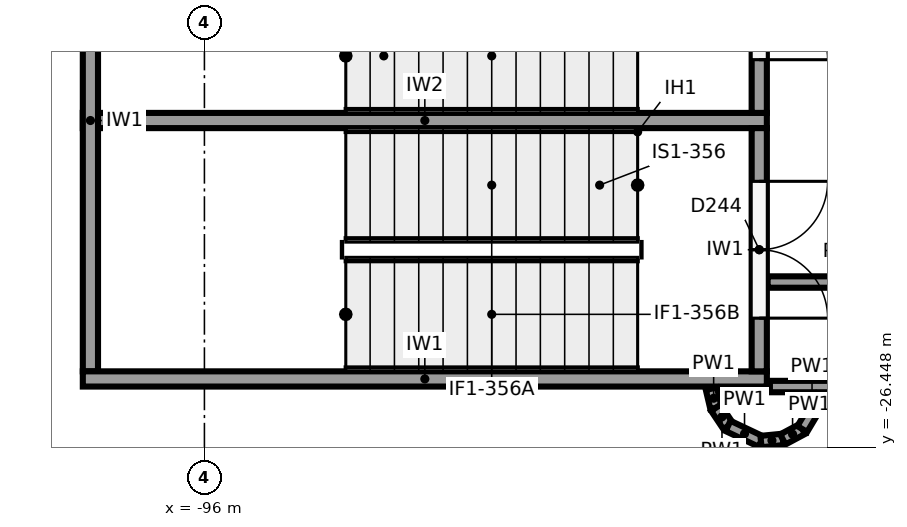
"""IFC4 building model, lengths in metres.
Left out: names, types, materials, properties, quantities, classifications, styles, units other than length and angle.
Written with IfcOpenShell. Run it as: python <this file> out.ifc"""

import sys

from ifc_helpers import new_model, si_unit, direction, frame, frame_2d, origin, place, context, subcontext, project, spatial, rectangle, extrude, element, fill, save


model = new_model("IFC4")
c1 = context("Model", 3, precision=1e-05, world=origin(), true_north=direction((0.0, 1.0)))
c2 = subcontext(c1, "Body", "Model", "MODEL_VIEW")
j1 = project(units=[si_unit("LENGTHUNIT", "METRE"), si_unit("PLANEANGLEUNIT", "RADIAN")], contexts=[c1])
p1 = place(None, origin())
s1 = spatial("IfcSite", under=j1, at=p1, CompositionType="ELEMENT")
p2 = place(p1, origin())
s2 = spatial("IfcBuilding", under=s1, at=p2, CompositionType="ELEMENT")
p3 = place(p2, frame((0.0, 0.0, -4.0)))
s3 = spatial("IfcBuildingStorey", under=s2, at=p3, CompositionType="ELEMENT", Elevation=-4.0)
p4 = place(p3, frame((-97.6, -25.55, -1.2), z_axis=(0.0, 0.0, 1.0), x_axis=(1.0, 0.0, 0.0)))
e1 = element("IfcWall", 1, at=p4, inside=s3, PredefinedType="SHEAR", context=c2, shape_type="SweptSolid", body=[
    extrude(rectangle(XDim=9.0, YDim=0.2, at=frame_2d((4.5, 0.0))), origin(), (0.0, 0.0, 1.0), 4.8),
])
p5 = place(p3, frame((-97.5, -18.85, -1.2), z_axis=(0.0, 0.0, 1.0), x_axis=(0.0, -1.0, 0.0)))
e2 = element("IfcWall", 2, at=p5, inside=s3, PredefinedType="SHEAR", context=c2, shape_type="SweptSolid", body=[
    extrude(rectangle(XDim=6.6, YDim=0.2, at=frame_2d((3.3, 0.0))), origin(), (0.0, 0.0, 1.0), 4.8),
])
p6 = place(p3, frame((-97.6, -22.15, -1.2), z_axis=(0.0, 0.0, 1.0), x_axis=(1.0, 0.0, 0.0)))
e3 = element("IfcWall", 3, at=p6, inside=s3, PredefinedType="SHEAR", context=c2, shape_type="SweptSolid", body=[
    extrude(rectangle(XDim=9.0, YDim=0.2, at=frame_2d((4.5, 0.0))), origin(), (0.0, 0.0, 1.0), 4.8),
])
p7 = place(p3, frame((-88.7, -18.85, -1.2), z_axis=(0.0, 0.0, 1.0), x_axis=(0.0, -1.0, 0.0)))
e4 = element("IfcWall", 4, at=p7, inside=s3, PredefinedType="SHEAR", context=c2, shape_type="SweptSolid", body=[
    extrude(rectangle(XDim=3.2, YDim=0.2, at=frame_2d((1.6, 0.0))), origin(), (0.0, 0.0, 1.0), 4.8),
])
p8 = place(p7, frame((0.7, 0.0, 1.2)))
e5 = element("IfcOpeningElement", 5, at=p8, cuts=e4, PredefinedType="OPENING", context=c2, shape_type="SweptSolid", body=[
    extrude(rectangle(XDim=1.8, YDim=2.1, at=frame_2d((0.9, 1.05))), frame((0.0, 0.11, 0.0), z_axis=(0.0, -1.0, 0.0), x_axis=(1.0, 0.0, 0.0)), (0.0, 0.0, 1.0), 0.22),
])
p9 = place(p3, frame((-88.7, -22.25, -1.2), z_axis=(0.0, 0.0, 1.0), x_axis=(0.0, -1.0, 0.0)))
e6 = element("IfcWall", 6, at=p9, inside=s3, PredefinedType="SHEAR", context=c2, shape_type="SweptSolid", body=[
    extrude(rectangle(XDim=3.2, YDim=0.2, at=frame_2d((1.6, 0.0))), origin(), (0.0, 0.0, 1.0), 4.8),
])
p10 = place(p9, frame((0.7, 0.0, 1.2)))
e7 = element("IfcOpeningElement", 7, at=p10, cuts=e6, PredefinedType="OPENING", context=c2, shape_type="SweptSolid", body=[
    extrude(rectangle(XDim=1.8, YDim=2.1, at=frame_2d((0.9, 1.05))), frame((0.0, 0.11, 0.0), z_axis=(0.0, -1.0, 0.0), x_axis=(1.0, 0.0, 0.0)), (0.0, 0.0, 1.0), 0.22),
])
p11 = place(p3, frame((-88.56, -25.65, 0.0), z_axis=(0.0, 0.0, 1.0), x_axis=(1.0, 0.0, 0.0)))
e8 = element("IfcWall", 8, at=p11, inside=s3, PredefinedType="PARTITIONING", context=c2, shape_type="SweptSolid", body=[
    extrude(rectangle(XDim=2.983, YDim=0.15, at=frame_2d((1.491, 0.0))), origin(), (0.0, 0.0, 1.0), 3.6),
])
p12 = place(p11, frame((0.95, 0.0, 0.0)))
e9 = element("IfcOpeningElement", 9, at=p12, cuts=e8, PredefinedType="OPENING", context=c2, shape_type="SweptSolid", body=[
    extrude(rectangle(XDim=1.0, YDim=2.1, at=frame_2d((0.5, 1.05))), frame((0.0, 0.085, 0.0), z_axis=(0.0, -1.0, 0.0), x_axis=(1.0, 0.0, 0.0)), (0.0, 0.0, 1.0), 0.17),
])
p13 = place(p3, frame((-88.59, -24.275, 0.0), z_axis=(0.0, 0.0, 1.0), x_axis=(1.0, 0.0, 0.0)))
e10 = element("IfcWall", 10, at=p13, inside=s3, PredefinedType="PARTITIONING", context=c2, shape_type="SweptSolid", body=[
    extrude(rectangle(XDim=2.465, YDim=0.15, at=frame_2d((1.232, 0.0))), origin(), (0.0, 0.0, 1.0), 3.6),
])
p14 = place(p3, frame((-89.33, -25.678, 0.0), z_axis=(0.0, 0.0, 1.0), x_axis=(0.230253879357, -0.973130593004, 0.0)))
e11 = element("IfcWall", 11, at=p14, inside=s3, PredefinedType="PARTITIONING", context=c2, shape_type="SweptSolid", body=[
    extrude(rectangle(XDim=0.258, YDim=0.15, at=frame_2d((0.129, 0.0))), origin(), (0.0, 0.0, 1.0), 3.6),
])
p15 = place(p3, frame((-89.271, -25.929, 0.0), z_axis=(0.0, 0.0, 1.0), x_axis=(0.555678694372, -0.831397130511, 0.0)))
e12 = element("IfcWall", 12, at=p15, inside=s3, PredefinedType="PARTITIONING", context=c2, shape_type="SweptSolid", body=[
    extrude(rectangle(XDim=0.288, YDim=0.15, at=frame_2d((0.144, 0.0))), origin(), (0.0, 0.0, 1.0), 3.6),
])
p16 = place(p3, frame((-89.111, -26.168, 0.0), z_axis=(0.0, 0.0, 1.0), x_axis=(0.90398642908, -0.427561148889, 0.0)))
e13 = element("IfcWall", 13, at=p16, inside=s3, PredefinedType="PARTITIONING", context=c2, shape_type="SweptSolid", body=[
    extrude(rectangle(XDim=0.48, YDim=0.15, at=frame_2d((0.24, 0.0))), origin(), (0.0, 0.0, 1.0), 3.6),
])
for number, where, z_axis, x_axis in (
    (14, (-88.677, -26.374, 0.0), (0.0, 0.0, 1.0), (0.995, 0.098, 0.0)),
    (15, (-88.389, -26.345, 0.0), (0.0, 0.0, 1.0), (0.882, 0.472, 0.0)),
):
    element("IfcWall", number, at=place(p3, frame(where, z_axis=z_axis, x_axis=x_axis)), inside=s3, PredefinedType="PARTITIONING", context=c2, shape_type="SweptSolid", body=[
        extrude(rectangle(XDim=0.289, YDim=0.15, at=frame_2d((0.145, 0.0))), origin(), (0.0, 0.0, 1.0), 3.6),
    ])
p17 = place(p3, frame((-88.134, -26.209, 0.0), z_axis=(0.0, 0.0, 1.0), x_axis=(0.513060623194, 0.858352373404, 0.0)))
e16 = element("IfcWall", 16, at=p17, inside=s3, PredefinedType="PARTITIONING", context=c2, shape_type="SweptSolid", body=[
    extrude(rectangle(XDim=0.5, YDim=0.15, at=frame_2d((0.25, 0.0))), origin(), (0.0, 0.0, 1.0), 3.6),
])
p18 = place(p8, origin())
e17 = element("IfcDoor", 17, at=p18, inside=s3, OperationType="DOUBLE_DOOR_SINGLE_SWING", PredefinedType="DOOR", context=c2, shape_type="SweptSolid", body=[
    extrude(rectangle(XDim=1.8, YDim=2.1, at=frame_2d((0.9, 1.05))), frame((0.0, 0.025, 0.0), z_axis=(0.0, -1.0, 0.0), x_axis=(1.0, 0.0, 0.0)), (0.0, 0.0, 1.0), 0.05),
])
fill(e5, e17)
p19 = place(p10, origin())
e18 = element("IfcDoor", 18, at=p19, inside=s3, OperationType="DOUBLE_DOOR_SINGLE_SWING", PredefinedType="DOOR", context=c2, shape_type="SweptSolid", body=[
    extrude(rectangle(XDim=1.8, YDim=2.1, at=frame_2d((0.9, 1.05))), frame((0.0, 0.025, 0.0), z_axis=(0.0, -1.0, 0.0), x_axis=(1.0, 0.0, 0.0)), (0.0, 0.0, 1.0), 0.05),
])
fill(e7, e18)
save(model, sys.argv[1])
